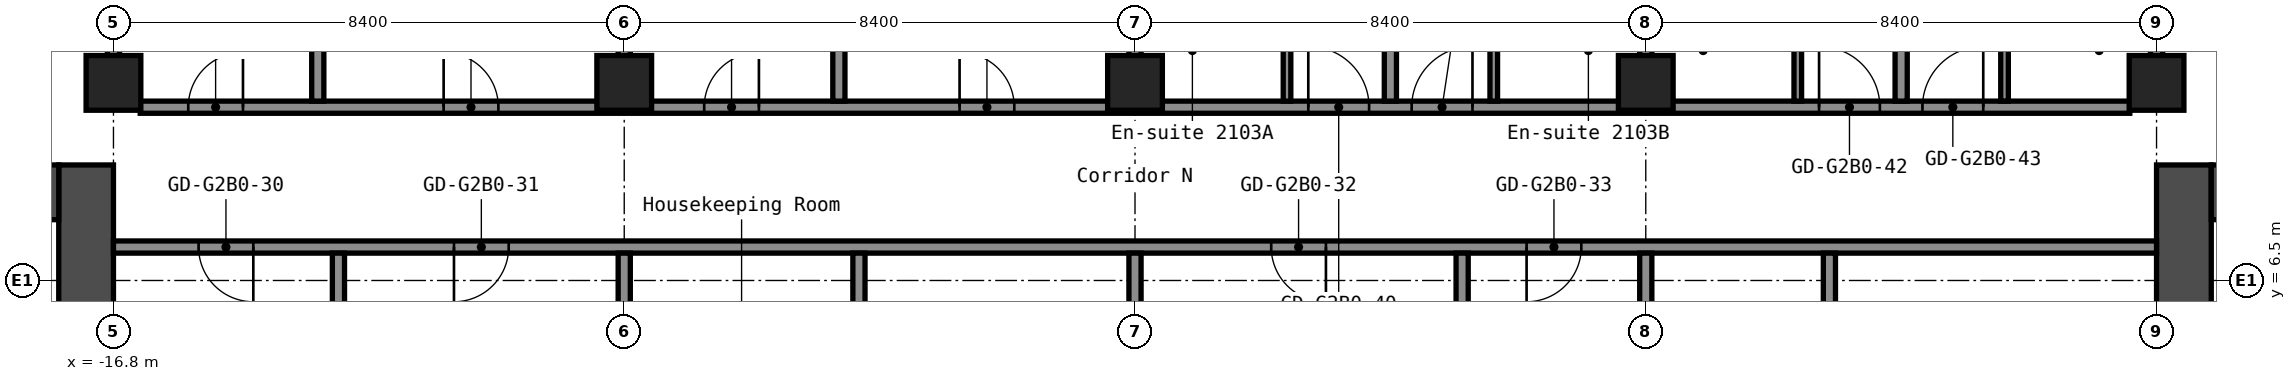
"""IFC4 building model, lengths in metres.
Left out: names, types, materials, properties, quantities, classifications, styles, units other than length and angle.
Written with IfcOpenShell. Run it as: python <this file> out.ifc"""

import sys

from ifc_helpers import new_model, si_unit, direction, frame, frame_2d, origin, origin_2d, place, context, subcontext, project, spatial, rectangle, hollow_rectangle, extrude, element, fill, save


model = new_model("IFC4")
c1 = context("Model", 3, precision=1e-05, world=origin(), true_north=direction((0.0, 1.0)))
c2 = subcontext(c1, "Body", "Model", "MODEL_VIEW")
j1 = project(units=[si_unit("LENGTHUNIT", "METRE"), si_unit("PLANEANGLEUNIT", "RADIAN")], contexts=[c1])
p1 = place(None, origin())
s1 = spatial("IfcSite", under=j1, at=p1, CompositionType="ELEMENT")
p2 = place(p1, origin())
s2 = spatial("IfcBuilding", under=s1, at=p2, CompositionType="ELEMENT")
p3 = place(p2, frame((0.0, 0.0, 78.6)))
s3 = spatial("IfcBuildingStorey", under=s2, at=p3, CompositionType="ELEMENT", Elevation=78.6)
for number, where, z_axis, x_axis in (
    (1, (-16.8, 9.75, 0.0), (0.0, 0.0, 1.0), (1.0, 0.0, 0.0)),
    (2, (-8.4, 9.75, 0.0), (0.0, 0.0, 1.0), (1.0, 0.0, 0.0)),
    (3, (0.0, 9.75, 0.0), (0.0, 0.0, 1.0), (1.0, 0.0, 0.0)),
    (4, (8.4, 9.75, 0.0), (0.0, 0.0, 1.0), (1.0, 0.0, 0.0)),
    (5, (16.8, 9.75, 0.0), (0.0, 0.0, 1.0), (1.0, 0.0, 0.0)),
):
    element("IfcColumn", number, at=place(p3, frame(where, z_axis=z_axis, x_axis=x_axis)), inside=s3, PredefinedType="COLUMN", context=c2, shape_type="SweptSolid", body=[
        extrude(hollow_rectangle(XDim=0.9, YDim=0.9, WallThickness=0.036, at=origin_2d()), origin(), (0.0, 0.0, 1.0), 2.8),
    ])
p4 = place(p3, frame((-17.25, -8.4, 0.0), z_axis=(0.0, 0.0, 1.0), x_axis=(0.0, 1.0, 0.0)))
e6 = element("IfcWall", 6, at=p4, inside=s3, PredefinedType="SHEAR", context=c2, shape_type="SweptSolid", body=[
    extrude(rectangle(XDim=16.8, YDim=0.9, at=frame_2d((8.4, 0.0))), origin(), (0.0, 0.0, 1.0), 2.8),
])
p5 = place(p4, frame((7.6, 0.0, 0.0)))
e7 = element("IfcOpeningElement", 7, at=p5, cuts=e6, PredefinedType="OPENING", context=c2, shape_type="SweptSolid", body=[
    extrude(rectangle(XDim=1.2, YDim=2.1, at=frame_2d((0.6, 1.05))), frame((0.0, 0.46, 0.0), z_axis=(0.0, -1.0, 0.0), x_axis=(1.0, 0.0, 0.0)), (0.0, 0.0, 1.0), 0.92),
])
p6 = place(p3, frame((-32.7, 7.95, 0.0), z_axis=(0.0, 0.0, 1.0), x_axis=(1.0, 0.0, 0.0)))
e8 = element("IfcWall", 8, at=p6, inside=s3, PredefinedType="SHEAR", context=c2, shape_type="SweptSolid", body=[
    extrude(rectangle(XDim=15.0, YDim=0.9, at=frame_2d((7.5, 0.0))), origin(), (0.0, 0.0, 1.0), 2.8),
])
p7 = place(p6, frame((3.4, 0.0, 0.0)))
e9 = element("IfcOpeningElement", 9, at=p7, cuts=e8, PredefinedType="OPENING", context=c2, shape_type="SweptSolid", body=[
    extrude(rectangle(XDim=1.2, YDim=2.1, at=frame_2d((0.6, 1.05))), frame((0.0, 0.46, 0.0), z_axis=(0.0, -1.0, 0.0), x_axis=(1.0, 0.0, 0.0)), (0.0, 0.0, 1.0), 0.92),
])
p8 = place(p6, frame((0.75, 0.0, 0.0)))
e10 = element("IfcOpeningElement", 10, at=p8, cuts=e8, PredefinedType="OPENING", context=c2, shape_type="SweptSolid", body=[
    extrude(rectangle(XDim=0.9, YDim=2.1, at=frame_2d((0.45, 1.05))), frame((0.0, 0.46, 0.0), z_axis=(0.0, -1.0, 0.0), x_axis=(1.0, 0.0, 0.0)), (0.0, 0.0, 1.0), 0.92),
])
p9 = place(p3, frame((17.25, -8.4, 0.0), z_axis=(0.0, 0.0, 1.0), x_axis=(0.0, 1.0, 0.0)))
e11 = element("IfcWall", 11, at=p9, inside=s3, PredefinedType="SHEAR", context=c2, shape_type="SweptSolid", body=[
    extrude(rectangle(XDim=16.8, YDim=0.9, at=frame_2d((8.4, 0.0))), origin(), (0.0, 0.0, 1.0), 2.8),
])
p10 = place(p9, frame((7.6, 0.0, 0.0)))
e12 = element("IfcOpeningElement", 12, at=p10, cuts=e11, PredefinedType="OPENING", context=c2, shape_type="SweptSolid", body=[
    extrude(rectangle(XDim=1.2, YDim=2.1, at=frame_2d((0.6, 1.05))), frame((0.0, 0.46, 0.0), z_axis=(0.0, -1.0, 0.0), x_axis=(1.0, 0.0, 0.0)), (0.0, 0.0, 1.0), 0.92),
])
p11 = place(p3, frame((17.7, 7.95, 0.0), z_axis=(0.0, 0.0, 1.0), x_axis=(1.0, 0.0, 0.0)))
e13 = element("IfcWall", 13, at=p11, inside=s3, PredefinedType="SHEAR", context=c2, shape_type="SweptSolid", body=[
    extrude(rectangle(XDim=15.0, YDim=0.9, at=frame_2d((7.5, 0.0))), origin(), (0.0, 0.0, 1.0), 2.8),
])
p12 = place(p11, frame((10.4, 0.0, 0.0)))
e14 = element("IfcOpeningElement", 14, at=p12, cuts=e13, PredefinedType="OPENING", context=c2, shape_type="SweptSolid", body=[
    extrude(rectangle(XDim=1.2, YDim=2.1, at=frame_2d((0.6, 1.05))), frame((0.0, 0.46, 0.0), z_axis=(0.0, -1.0, 0.0), x_axis=(1.0, 0.0, 0.0)), (0.0, 0.0, 1.0), 0.92),
])
p13 = place(p11, frame((13.35, 0.0, 0.0)))
e15 = element("IfcOpeningElement", 15, at=p13, cuts=e13, PredefinedType="OPENING", context=c2, shape_type="SweptSolid", body=[
    extrude(rectangle(XDim=0.9, YDim=2.1, at=frame_2d((0.45, 1.05))), frame((0.0, 0.46, 0.0), z_axis=(0.0, -1.0, 0.0), x_axis=(1.0, 0.0, 0.0)), (0.0, 0.0, 1.0), 0.92),
])
p14 = place(p3, frame((-16.8, 7.05, 0.0), z_axis=(0.0, 0.0, 1.0), x_axis=(1.0, 0.0, 0.0)))
e16 = element("IfcWall", 16, at=p14, inside=s3, PredefinedType="PARTITIONING", context=c2, shape_type="SweptSolid", body=[
    extrude(rectangle(XDim=33.6, YDim=0.2, at=frame_2d((16.8, 0.0))), origin(), (0.0, 0.0, 1.0), 2.8),
])
p15 = place(p14, frame((1.4, 0.0, 0.0)))
e17 = element("IfcOpeningElement", 17, at=p15, cuts=e16, PredefinedType="OPENING", context=c2, shape_type="SweptSolid", body=[
    extrude(rectangle(XDim=0.9, YDim=2.1, at=frame_2d((0.45, 1.05))), frame((0.0, 0.11, 0.0), z_axis=(0.0, -1.0, 0.0), x_axis=(1.0, 0.0, 0.0)), (0.0, 0.0, 1.0), 0.22),
])
p16 = place(p14, frame((5.6, 0.0, 0.0)))
e18 = element("IfcOpeningElement", 18, at=p16, cuts=e16, PredefinedType="OPENING", context=c2, shape_type="SweptSolid", body=[
    extrude(rectangle(XDim=0.9, YDim=2.1, at=frame_2d((0.45, 1.05))), frame((0.0, 0.11, 0.0), z_axis=(0.0, -1.0, 0.0), x_axis=(1.0, 0.0, 0.0)), (0.0, 0.0, 1.0), 0.22),
])
p17 = place(p14, frame((19.04, 0.0, 0.0)))
e19 = element("IfcOpeningElement", 19, at=p17, cuts=e16, PredefinedType="OPENING", context=c2, shape_type="SweptSolid", body=[
    extrude(rectangle(XDim=0.9, YDim=2.1, at=frame_2d((0.45, 1.05))), frame((0.0, 0.11, 0.0), z_axis=(0.0, -1.0, 0.0), x_axis=(1.0, 0.0, 0.0)), (0.0, 0.0, 1.0), 0.22),
])
p18 = place(p14, frame((23.24, 0.0, 0.0)))
e20 = element("IfcOpeningElement", 20, at=p18, cuts=e16, PredefinedType="OPENING", context=c2, shape_type="SweptSolid", body=[
    extrude(rectangle(XDim=0.9, YDim=2.1, at=frame_2d((0.45, 1.05))), frame((0.0, 0.11, 0.0), z_axis=(0.0, -1.0, 0.0), x_axis=(1.0, 0.0, 0.0)), (0.0, 0.0, 1.0), 0.22),
])
p19 = place(p3, frame((-16.36, 9.35, 0.0), z_axis=(0.0, 0.0, 1.0), x_axis=(1.0, 0.0, 0.0)))
e21 = element("IfcWall", 21, at=p19, inside=s3, PredefinedType="PARTITIONING", context=c2, shape_type="SweptSolid", body=[
    extrude(rectangle(XDim=32.72, YDim=0.2, at=frame_2d((16.36, 0.0))), origin(), (0.0, 0.0, 1.0), 2.8),
])
p20 = place(p19, frame((0.79, 0.0, 0.0)))
e22 = element("IfcOpeningElement", 22, at=p20, cuts=e21, PredefinedType="OPENING", context=c2, shape_type="SweptSolid", body=[
    extrude(rectangle(XDim=0.9, YDim=2.1, at=frame_2d((0.45, 1.05))), frame((0.0, 0.11, 0.0), z_axis=(0.0, -1.0, 0.0), x_axis=(1.0, 0.0, 0.0)), (0.0, 0.0, 1.0), 0.22),
])
p21 = place(p19, frame((4.99, 0.0, 0.0)))
e23 = element("IfcOpeningElement", 23, at=p21, cuts=e21, PredefinedType="OPENING", context=c2, shape_type="SweptSolid", body=[
    extrude(rectangle(XDim=0.9, YDim=2.1, at=frame_2d((0.45, 1.05))), frame((0.0, 0.11, 0.0), z_axis=(0.0, -1.0, 0.0), x_axis=(1.0, 0.0, 0.0)), (0.0, 0.0, 1.0), 0.22),
])
p22 = place(p19, frame((9.275, 0.0, 0.0)))
e24 = element("IfcOpeningElement", 24, at=p22, cuts=e21, PredefinedType="OPENING", context=c2, shape_type="SweptSolid", body=[
    extrude(rectangle(XDim=0.9, YDim=2.1, at=frame_2d((0.45, 1.05))), frame((0.0, 0.11, 0.0), z_axis=(0.0, -1.0, 0.0), x_axis=(1.0, 0.0, 0.0)), (0.0, 0.0, 1.0), 0.22),
])
p23 = place(p19, frame((13.475, 0.0, 0.0)))
e25 = element("IfcOpeningElement", 25, at=p23, cuts=e21, PredefinedType="OPENING", context=c2, shape_type="SweptSolid", body=[
    extrude(rectangle(XDim=0.9, YDim=2.1, at=frame_2d((0.45, 1.05))), frame((0.0, 0.11, 0.0), z_axis=(0.0, -1.0, 0.0), x_axis=(1.0, 0.0, 0.0)), (0.0, 0.0, 1.0), 0.22),
])
p24 = place(p19, frame((19.21, 0.0, 0.0)))
e26 = element("IfcOpeningElement", 26, at=p24, cuts=e21, PredefinedType="OPENING", context=c2, shape_type="SweptSolid", body=[
    extrude(rectangle(XDim=1.0, YDim=2.1, at=frame_2d((0.5, 1.05))), frame((0.0, 0.11, 0.0), z_axis=(0.0, -1.0, 0.0), x_axis=(1.0, 0.0, 0.0)), (0.0, 0.0, 1.0), 0.22),
])
p25 = place(p19, frame((20.91, 0.0, 0.0)))
e27 = element("IfcOpeningElement", 27, at=p25, cuts=e21, PredefinedType="OPENING", context=c2, shape_type="SweptSolid", body=[
    extrude(rectangle(XDim=1.0, YDim=2.1, at=frame_2d((0.5, 1.05))), frame((0.0, 0.11, 0.0), z_axis=(0.0, -1.0, 0.0), x_axis=(1.0, 0.0, 0.0)), (0.0, 0.0, 1.0), 0.22),
])
p26 = place(p19, frame((27.61, 0.0, 0.0)))
e28 = element("IfcOpeningElement", 28, at=p26, cuts=e21, PredefinedType="OPENING", context=c2, shape_type="SweptSolid", body=[
    extrude(rectangle(XDim=1.0, YDim=2.1, at=frame_2d((0.5, 1.05))), frame((0.0, 0.11, 0.0), z_axis=(0.0, -1.0, 0.0), x_axis=(1.0, 0.0, 0.0)), (0.0, 0.0, 1.0), 0.22),
])
p27 = place(p19, frame((29.31, 0.0, 0.0)))
e29 = element("IfcOpeningElement", 29, at=p27, cuts=e21, PredefinedType="OPENING", context=c2, shape_type="SweptSolid", body=[
    extrude(rectangle(XDim=1.0, YDim=2.1, at=frame_2d((0.5, 1.05))), frame((0.0, 0.11, 0.0), z_axis=(0.0, -1.0, 0.0), x_axis=(1.0, 0.0, 0.0)), (0.0, 0.0, 1.0), 0.22),
])
p28 = place(p3, frame((-16.8, 10.19, 0.0), z_axis=(0.0, 0.0, 1.0), x_axis=(0.0, 1.0, 0.0)))
e30 = element("IfcWall", 30, at=p28, inside=s3, PredefinedType="PARTITIONING", context=c2, shape_type="SweptSolid", body=[
    extrude(rectangle(XDim=13.36, YDim=0.2, at=frame_2d((6.68, 0.0))), origin(), (0.0, 0.0, 1.0), 2.8),
])
p29 = place(p3, frame((-13.44, 9.45, 0.0), z_axis=(0.0, 0.0, 1.0), x_axis=(0.0, 1.0, 0.0)))
e31 = element("IfcWall", 31, at=p29, inside=s3, PredefinedType="PARTITIONING", context=c2, shape_type="SweptSolid", body=[
    extrude(rectangle(XDim=14.1, YDim=0.2, at=frame_2d((7.05, 0.0))), origin(), (0.0, 0.0, 1.0), 2.8),
])
for number, where, z_axis, x_axis in (
    (32, (-13.1, 1.05, 0.0), (0.0, 0.0, 1.0), (0.0, 1.0, 0.0)),
    (33, (-8.4, 1.05, 0.0), (0.0, 0.0, 1.0), (0.0, 1.0, 0.0)),
):
    element("IfcWall", number, at=place(p3, frame(where, z_axis=z_axis, x_axis=x_axis)), inside=s3, PredefinedType="PARTITIONING", context=c2, shape_type="SweptSolid", body=[
        extrude(rectangle(XDim=5.9, YDim=0.2, at=frame_2d((2.95, 0.0))), origin(), (0.0, 0.0, 1.0), 2.8),
    ])
p30 = place(p3, frame((-8.4, 10.19, 0.0), z_axis=(0.0, 0.0, 1.0), x_axis=(0.0, 1.0, 0.0)))
e34 = element("IfcWall", 34, at=p30, inside=s3, PredefinedType="PARTITIONING", context=c2, shape_type="SweptSolid", body=[
    extrude(rectangle(XDim=13.36, YDim=0.2, at=frame_2d((6.68, 0.0))), origin(), (0.0, 0.0, 1.0), 2.8),
])
p31 = place(p3, frame((-4.87, 9.45, 0.0), z_axis=(0.0, 0.0, 1.0), x_axis=(0.0, 1.0, 0.0)))
e35 = element("IfcWall", 35, at=p31, inside=s3, PredefinedType="PARTITIONING", context=c2, shape_type="SweptSolid", body=[
    extrude(rectangle(XDim=14.1, YDim=0.2, at=frame_2d((7.05, 0.0))), origin(), (0.0, 0.0, 1.0), 2.8),
])
for number, where, z_axis, x_axis in (
    (36, (-4.54, 1.05, 0.0), (0.0, 0.0, 1.0), (0.0, 1.0, 0.0)),
    (37, (0.0, 1.05, 0.0), (0.0, 0.0, 1.0), (0.0, 1.0, 0.0)),
):
    element("IfcWall", number, at=place(p3, frame(where, z_axis=z_axis, x_axis=x_axis)), inside=s3, PredefinedType="PARTITIONING", context=c2, shape_type="SweptSolid", body=[
        extrude(rectangle(XDim=5.9, YDim=0.2, at=frame_2d((2.95, 0.0))), origin(), (0.0, 0.0, 1.0), 2.8),
    ])
p32 = place(p3, frame((0.0, 10.19, 0.0), z_axis=(0.0, 0.0, 1.0), x_axis=(0.0, 1.0, 0.0)))
e38 = element("IfcWall", 38, at=p32, inside=s3, PredefinedType="PARTITIONING", context=c2, shape_type="SweptSolid", body=[
    extrude(rectangle(XDim=13.36, YDim=0.2, at=frame_2d((6.68, 0.0))), origin(), (0.0, 0.0, 1.0), 2.8),
])
p33 = place(p3, frame((2.5, 9.45, 0.0), z_axis=(0.0, 0.0, 1.0), x_axis=(0.0, 1.0, 0.0)))
e39 = element("IfcWall", 39, at=p33, inside=s3, PredefinedType="PARTITIONING", context=c2, shape_type="SweptSolid", body=[
    extrude(rectangle(XDim=2.9, YDim=0.125, at=frame_2d((1.45, 0.0))), origin(), (0.0, 0.0, 1.0), 2.8),
])
p34 = place(p33, frame((1.5, 0.0, 0.0)))
e40 = element("IfcOpeningElement", 40, at=p34, cuts=e39, PredefinedType="OPENING", context=c2, shape_type="SweptSolid", body=[
    extrude(rectangle(XDim=0.8, YDim=2.1, at=frame_2d((0.4, 1.05))), frame((0.0, 0.073, 0.0), z_axis=(0.0, -1.0, 0.0), x_axis=(1.0, 0.0, 0.0)), (0.0, 0.0, 1.0), 0.145),
])
p35 = place(p3, frame((4.2, 9.45, 0.0), z_axis=(0.0, 0.0, 1.0), x_axis=(0.0, 1.0, 0.0)))
e41 = element("IfcWall", 41, at=p35, inside=s3, PredefinedType="PARTITIONING", context=c2, shape_type="SweptSolid", body=[
    extrude(rectangle(XDim=14.1, YDim=0.2, at=frame_2d((7.05, 0.0))), origin(), (0.0, 0.0, 1.0), 2.8),
])
p36 = place(p3, frame((5.38, 1.05, 0.0), z_axis=(0.0, 0.0, 1.0), x_axis=(0.0, 1.0, 0.0)))
e42 = element("IfcWall", 42, at=p36, inside=s3, PredefinedType="PARTITIONING", context=c2, shape_type="SweptSolid", body=[
    extrude(rectangle(XDim=5.9, YDim=0.2, at=frame_2d((2.95, 0.0))), origin(), (0.0, 0.0, 1.0), 2.8),
])
p37 = place(p3, frame((5.9, 9.45, 0.0), z_axis=(0.0, 0.0, 1.0), x_axis=(0.0, 1.0, 0.0)))
e43 = element("IfcWall", 43, at=p37, inside=s3, PredefinedType="PARTITIONING", context=c2, shape_type="SweptSolid", body=[
    extrude(rectangle(XDim=2.9, YDim=0.125, at=frame_2d((1.45, 0.0))), origin(), (0.0, 0.0, 1.0), 2.8),
])
p38 = place(p37, frame((1.5, 0.0, 0.0)))
e44 = element("IfcOpeningElement", 44, at=p38, cuts=e43, PredefinedType="OPENING", context=c2, shape_type="SweptSolid", body=[
    extrude(rectangle(XDim=0.8, YDim=2.1, at=frame_2d((0.4, 1.05))), frame((0.0, 0.073, 0.0), z_axis=(0.0, -1.0, 0.0), x_axis=(1.0, 0.0, 0.0)), (0.0, 0.0, 1.0), 0.145),
])
p39 = place(p3, frame((8.4, 1.05, 0.0), z_axis=(0.0, 0.0, 1.0), x_axis=(0.0, 1.0, 0.0)))
e45 = element("IfcWall", 45, at=p39, inside=s3, PredefinedType="PARTITIONING", context=c2, shape_type="SweptSolid", body=[
    extrude(rectangle(XDim=5.9, YDim=0.2, at=frame_2d((2.95, 0.0))), origin(), (0.0, 0.0, 1.0), 2.8),
])
p40 = place(p3, frame((8.4, 10.19, 0.0), z_axis=(0.0, 0.0, 1.0), x_axis=(0.0, 1.0, 0.0)))
e46 = element("IfcWall", 46, at=p40, inside=s3, PredefinedType="PARTITIONING", context=c2, shape_type="SweptSolid", body=[
    extrude(rectangle(XDim=13.36, YDim=0.2, at=frame_2d((6.68, 0.0))), origin(), (0.0, 0.0, 1.0), 2.8),
])
p41 = place(p3, frame((10.9, 9.45, 0.0), z_axis=(0.0, 0.0, 1.0), x_axis=(0.0, 1.0, 0.0)))
e47 = element("IfcWall", 47, at=p41, inside=s3, PredefinedType="PARTITIONING", context=c2, shape_type="SweptSolid", body=[
    extrude(rectangle(XDim=2.9, YDim=0.125, at=frame_2d((1.45, 0.0))), origin(), (0.0, 0.0, 1.0), 2.8),
])
p42 = place(p41, frame((1.5, 0.0, 0.0)))
e48 = element("IfcOpeningElement", 48, at=p42, cuts=e47, PredefinedType="OPENING", context=c2, shape_type="SweptSolid", body=[
    extrude(rectangle(XDim=0.8, YDim=2.1, at=frame_2d((0.4, 1.05))), frame((0.0, 0.073, 0.0), z_axis=(0.0, -1.0, 0.0), x_axis=(1.0, 0.0, 0.0)), (0.0, 0.0, 1.0), 0.145),
])
p43 = place(p3, frame((11.42, 1.05, 0.0), z_axis=(0.0, 0.0, 1.0), x_axis=(0.0, 1.0, 0.0)))
e49 = element("IfcWall", 49, at=p43, inside=s3, PredefinedType="PARTITIONING", context=c2, shape_type="SweptSolid", body=[
    extrude(rectangle(XDim=5.9, YDim=0.2, at=frame_2d((2.95, 0.0))), origin(), (0.0, 0.0, 1.0), 2.8),
])
p44 = place(p3, frame((12.6, 9.45, 0.0), z_axis=(0.0, 0.0, 1.0), x_axis=(0.0, 1.0, 0.0)))
e50 = element("IfcWall", 50, at=p44, inside=s3, PredefinedType="PARTITIONING", context=c2, shape_type="SweptSolid", body=[
    extrude(rectangle(XDim=14.1, YDim=0.2, at=frame_2d((7.05, 0.0))), origin(), (0.0, 0.0, 1.0), 2.8),
])
p45 = place(p3, frame((14.3, 9.45, 0.0), z_axis=(0.0, 0.0, 1.0), x_axis=(0.0, 1.0, 0.0)))
e51 = element("IfcWall", 51, at=p45, inside=s3, PredefinedType="PARTITIONING", context=c2, shape_type="SweptSolid", body=[
    extrude(rectangle(XDim=2.9, YDim=0.125, at=frame_2d((1.45, 0.0))), origin(), (0.0, 0.0, 1.0), 2.8),
])
p46 = place(p45, frame((1.5, 0.0, 0.0)))
e52 = element("IfcOpeningElement", 52, at=p46, cuts=e51, PredefinedType="OPENING", context=c2, shape_type="SweptSolid", body=[
    extrude(rectangle(XDim=0.8, YDim=2.1, at=frame_2d((0.4, 1.05))), frame((0.0, 0.073, 0.0), z_axis=(0.0, -1.0, 0.0), x_axis=(1.0, 0.0, 0.0)), (0.0, 0.0, 1.0), 0.145),
])
p47 = place(p3, frame((16.8, 10.19, 0.0), z_axis=(0.0, 0.0, 1.0), x_axis=(0.0, 1.0, 0.0)))
e53 = element("IfcWall", 53, at=p47, inside=s3, PredefinedType="PARTITIONING", context=c2, shape_type="SweptSolid", body=[
    extrude(rectangle(XDim=13.36, YDim=0.2, at=frame_2d((6.68, 0.0))), origin(), (0.0, 0.0, 1.0), 2.8),
])
p48 = place(p15, origin())
e54 = element("IfcDoor", 54, at=p48, inside=s3, OperationType="SINGLE_SWING_RIGHT", PredefinedType="DOOR", context=c2, shape_type="SweptSolid", body=[
    extrude(rectangle(XDim=0.9, YDim=2.1, at=frame_2d((0.45, 1.05))), frame((0.0, 0.025, 0.0), z_axis=(0.0, -1.0, 0.0), x_axis=(1.0, 0.0, 0.0)), (0.0, 0.0, 1.0), 0.05),
])
fill(e17, e54)
p49 = place(p16, origin())
e55 = element("IfcDoor", 55, at=p49, inside=s3, OperationType="SINGLE_SWING_LEFT", PredefinedType="DOOR", context=c2, shape_type="SweptSolid", body=[
    extrude(rectangle(XDim=0.9, YDim=2.1, at=frame_2d((0.45, 1.05))), frame((0.0, 0.025, 0.0), z_axis=(0.0, -1.0, 0.0), x_axis=(1.0, 0.0, 0.0)), (0.0, 0.0, 1.0), 0.05),
])
fill(e18, e55)
p50 = place(p17, origin())
e56 = element("IfcDoor", 56, at=p50, inside=s3, OperationType="SINGLE_SWING_RIGHT", PredefinedType="DOOR", context=c2, shape_type="SweptSolid", body=[
    extrude(rectangle(XDim=0.9, YDim=2.1, at=frame_2d((0.45, 1.05))), frame((0.0, 0.025, 0.0), z_axis=(0.0, -1.0, 0.0), x_axis=(1.0, 0.0, 0.0)), (0.0, 0.0, 1.0), 0.05),
])
fill(e19, e56)
p51 = place(p18, origin())
e57 = element("IfcDoor", 57, at=p51, inside=s3, OperationType="SINGLE_SWING_LEFT", PredefinedType="DOOR", context=c2, shape_type="SweptSolid", body=[
    extrude(rectangle(XDim=0.9, YDim=2.1, at=frame_2d((0.45, 1.05))), frame((0.0, 0.025, 0.0), z_axis=(0.0, -1.0, 0.0), x_axis=(1.0, 0.0, 0.0)), (0.0, 0.0, 1.0), 0.05),
])
fill(e20, e57)
p52 = place(p20, origin())
e58 = element("IfcDoor", 58, at=p52, inside=s3, OperationType="SINGLE_SWING_LEFT", PredefinedType="DOOR", context=c2, shape_type="SweptSolid", body=[
    extrude(rectangle(XDim=0.9, YDim=2.1, at=frame_2d((0.45, 1.05))), frame((0.0, 0.025, 0.0), z_axis=(0.0, -1.0, 0.0), x_axis=(1.0, 0.0, 0.0)), (0.0, 0.0, 1.0), 0.05),
])
fill(e22, e58)
p53 = place(p21, origin())
e59 = element("IfcDoor", 59, at=p53, inside=s3, OperationType="SINGLE_SWING_RIGHT", PredefinedType="DOOR", context=c2, shape_type="SweptSolid", body=[
    extrude(rectangle(XDim=0.9, YDim=2.1, at=frame_2d((0.45, 1.05))), frame((0.0, 0.025, 0.0), z_axis=(0.0, -1.0, 0.0), x_axis=(1.0, 0.0, 0.0)), (0.0, 0.0, 1.0), 0.05),
])
fill(e23, e59)
p54 = place(p22, origin())
e60 = element("IfcDoor", 60, at=p54, inside=s3, OperationType="SINGLE_SWING_LEFT", PredefinedType="DOOR", context=c2, shape_type="SweptSolid", body=[
    extrude(rectangle(XDim=0.9, YDim=2.1, at=frame_2d((0.45, 1.05))), frame((0.0, 0.025, 0.0), z_axis=(0.0, -1.0, 0.0), x_axis=(1.0, 0.0, 0.0)), (0.0, 0.0, 1.0), 0.05),
])
fill(e24, e60)
p55 = place(p23, origin())
e61 = element("IfcDoor", 61, at=p55, inside=s3, OperationType="SINGLE_SWING_RIGHT", PredefinedType="DOOR", context=c2, shape_type="SweptSolid", body=[
    extrude(rectangle(XDim=0.9, YDim=2.1, at=frame_2d((0.45, 1.05))), frame((0.0, 0.025, 0.0), z_axis=(0.0, -1.0, 0.0), x_axis=(1.0, 0.0, 0.0)), (0.0, 0.0, 1.0), 0.05),
])
fill(e25, e61)
p56 = place(p24, origin())
e62 = element("IfcDoor", 62, at=p56, inside=s3, OperationType="SINGLE_SWING_RIGHT", PredefinedType="DOOR", context=c2, shape_type="SweptSolid", body=[
    extrude(rectangle(XDim=1.0, YDim=2.1, at=frame_2d((0.5, 1.05))), frame((0.0, 0.025, 0.0), z_axis=(0.0, -1.0, 0.0), x_axis=(1.0, 0.0, 0.0)), (0.0, 0.0, 1.0), 0.05),
])
fill(e26, e62)
p57 = place(p25, origin())
e63 = element("IfcDoor", 63, at=p57, inside=s3, OperationType="SINGLE_SWING_LEFT", PredefinedType="DOOR", context=c2, shape_type="SweptSolid", body=[
    extrude(rectangle(XDim=1.0, YDim=2.1, at=frame_2d((0.5, 1.05))), frame((0.0, 0.025, 0.0), z_axis=(0.0, -1.0, 0.0), x_axis=(1.0, 0.0, 0.0)), (0.0, 0.0, 1.0), 0.05),
])
fill(e27, e63)
p58 = place(p26, origin())
e64 = element("IfcDoor", 64, at=p58, inside=s3, OperationType="SINGLE_SWING_RIGHT", PredefinedType="DOOR", context=c2, shape_type="SweptSolid", body=[
    extrude(rectangle(XDim=1.0, YDim=2.1, at=frame_2d((0.5, 1.05))), frame((0.0, 0.025, 0.0), z_axis=(0.0, -1.0, 0.0), x_axis=(1.0, 0.0, 0.0)), (0.0, 0.0, 1.0), 0.05),
])
fill(e28, e64)
p59 = place(p27, origin())
e65 = element("IfcDoor", 65, at=p59, inside=s3, OperationType="SINGLE_SWING_LEFT", PredefinedType="DOOR", context=c2, shape_type="SweptSolid", body=[
    extrude(rectangle(XDim=1.0, YDim=2.1, at=frame_2d((0.5, 1.05))), frame((0.0, 0.025, 0.0), z_axis=(0.0, -1.0, 0.0), x_axis=(1.0, 0.0, 0.0)), (0.0, 0.0, 1.0), 0.05),
])
fill(e29, e65)
save(model, sys.argv[1])
